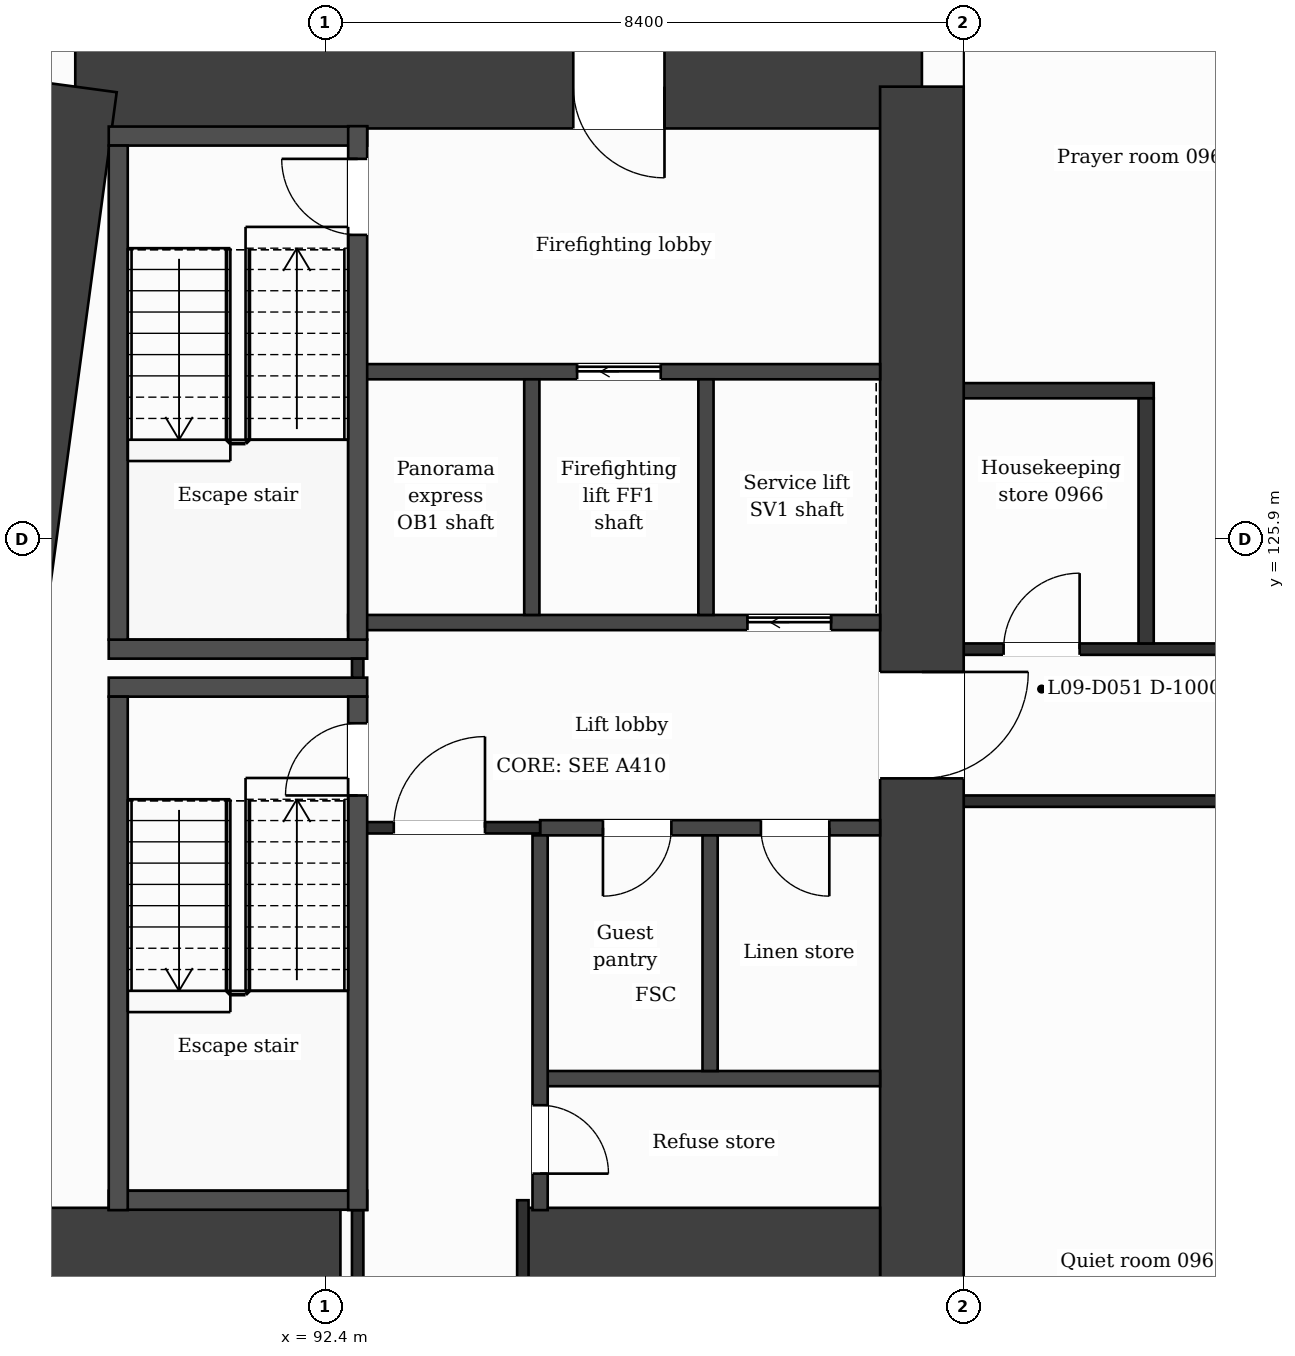
"""IFC4 building model, lengths in metres.
Left out: names, types, materials, properties, quantities, classifications, styles, units other than length and angle.
Written with IfcOpenShell. Run it as: python <this file> out.ifc"""

import sys

from ifc_helpers import new_model, si_unit, direction, frame, frame_2d, origin, place, context, subcontext, project, spatial, rectangle, extrude, element, fill, save


model = new_model("IFC4")
c1 = context("Model", 3, precision=1e-05, world=origin(), true_north=direction((0.0, 1.0)))
c2 = subcontext(c1, "Body", "Model", "MODEL_VIEW")
j1 = project(units=[si_unit("LENGTHUNIT", "METRE"), si_unit("PLANEANGLEUNIT", "RADIAN")], contexts=[c1])
p1 = place(None, origin())
s1 = spatial("IfcSite", under=j1, at=p1, CompositionType="ELEMENT")
p2 = place(p1, origin())
s2 = spatial("IfcBuilding", under=s1, at=p2, CompositionType="ELEMENT")
p3 = place(p2, frame((0.0, 0.0, 49.5)))
s3 = spatial("IfcBuildingStorey", under=s2, at=p3, CompositionType="ELEMENT", Elevation=49.5)
p4 = place(p3, frame((89.112, 131.85, 0.0), z_axis=(0.0, 0.0, 1.0), x_axis=(1.0, 0.0, 0.0)))
e1 = element("IfcWall", 1, at=p4, inside=s3, PredefinedType="SHEAR", context=c2, shape_type="SweptSolid", body=[
    extrude(rectangle(XDim=11.138, YDim=1.1, at=frame_2d((5.569, 0.0))), origin(), (0.0, 0.0, 1.0), 3.5),
])
p5 = place(p4, frame((6.552, 0.0, 0.0)))
e2 = element("IfcOpeningElement", 2, at=p5, cuts=e1, PredefinedType="OPENING", context=c2, shape_type="SweptSolid", body=[
    extrude(rectangle(XDim=1.2, YDim=2.1, at=frame_2d((0.6, 1.05))), frame((0.0, 0.56, 0.0), z_axis=(0.0, -1.0, 0.0), x_axis=(1.0, 0.0, 0.0)), (0.0, 0.0, 1.0), 1.12),
])
p6 = place(p3, frame((100.25, 131.85, 0.0), z_axis=(0.0, 0.0, 1.0), x_axis=(0.0, -1.0, 0.0)))
e3 = element("IfcWall", 3, at=p6, inside=s3, PredefinedType="SHEAR", context=c2, shape_type="SweptSolid", body=[
    extrude(rectangle(XDim=20.9, YDim=1.1, at=frame_2d((10.45, 0.0))), origin(), (0.0, 0.0, 1.0), 3.5),
])
p7 = place(p6, frame((7.7, 0.0, 0.0)))
e4 = element("IfcOpeningElement", 4, at=p7, cuts=e3, PredefinedType="OPENING", context=c2, shape_type="SweptSolid", body=[
    extrude(rectangle(XDim=1.4, YDim=2.1, at=frame_2d((0.7, 1.05))), frame((0.0, 0.56, 0.0), z_axis=(0.0, -1.0, 0.0), x_axis=(1.0, 0.0, 0.0)), (0.0, 0.0, 1.0), 1.12),
])
p8 = place(p3, frame((86.298, 110.95, 0.0), z_axis=(0.0, 0.0, 1.0), x_axis=(0.133400422634, 0.99106222168, 0.0)))
e5 = element("IfcWall", 5, at=p8, inside=s3, PredefinedType="SHEAR", context=c2, shape_type="SweptSolid", body=[
    extrude(rectangle(XDim=21.089, YDim=1.1, at=frame_2d((10.544, 0.0))), origin(), (0.0, 0.0, 1.0), 3.5),
])
p9 = place(p3, frame((87.523, 116.55, 0.0), z_axis=(0.0, 0.0, 1.0), x_axis=(1.0, 0.0, 0.0)))
e6 = element("IfcWall", 6, at=p9, inside=s3, PredefinedType="SHEAR", context=c2, shape_type="SweptSolid", body=[
    extrude(rectangle(XDim=5.077, YDim=1.1, at=frame_2d((2.539, 0.0))), origin(), (0.0, 0.0, 1.0), 3.5),
])
p10 = place(p3, frame((95.0, 116.55, 0.0), z_axis=(0.0, 0.0, 1.0), x_axis=(1.0, 0.0, 0.0)))
e7 = element("IfcWall", 7, at=p10, inside=s3, PredefinedType="SHEAR", context=c2, shape_type="SweptSolid", body=[
    extrude(rectangle(XDim=4.7, YDim=1.1, at=frame_2d((2.35, 0.0))), origin(), (0.0, 0.0, 1.0), 3.5),
])
p11 = place(p3, frame((89.552, 117.2, 0.0), z_axis=(0.0, 0.0, 1.0), x_axis=(1.0, 0.0, 0.0)))
e8 = element("IfcWall", 8, at=p11, inside=s3, PredefinedType="PARTITIONING", context=c2, shape_type="SweptSolid", body=[
    extrude(rectangle(XDim=3.4, YDim=0.25, at=frame_2d((1.7, 0.0))), origin(), (0.0, 0.0, 1.0), 3.18),
])
p12 = place(p3, frame((95.227, 118.8, 0.0), z_axis=(0.0, 0.0, 1.0), x_axis=(1.0, 0.0, 0.0)))
e9 = element("IfcWall", 9, at=p12, inside=s3, PredefinedType="PARTITIONING", context=c2, shape_type="SweptSolid", body=[
    extrude(rectangle(XDim=4.473, YDim=0.2, at=frame_2d((2.236, 0.0))), origin(), (0.0, 0.0, 1.0), 3.18),
])
p13 = place(p3, frame((95.227, 122.1, 0.0), z_axis=(0.0, 0.0, 1.0), x_axis=(1.0, 0.0, 0.0)))
e10 = element("IfcWall", 10, at=p13, inside=s3, PredefinedType="PARTITIONING", context=c2, shape_type="SweptSolid", body=[
    extrude(rectangle(XDim=4.473, YDim=0.2, at=frame_2d((2.236, 0.0))), origin(), (0.0, 0.0, 1.0), 3.18),
])
p14 = place(p13, frame((0.827, 0.0, 0.0)))
e11 = element("IfcOpeningElement", 11, at=p14, cuts=e10, PredefinedType="OPENING", context=c2, shape_type="SweptSolid", body=[
    extrude(rectangle(XDim=0.9, YDim=2.1, at=frame_2d((0.45, 1.05))), frame((0.0, 0.11, 0.0), z_axis=(0.0, -1.0, 0.0), x_axis=(1.0, 0.0, 0.0)), (0.0, 0.0, 1.0), 0.22),
])
p15 = place(p13, frame((2.905, 0.0, 0.0)))
e12 = element("IfcOpeningElement", 12, at=p15, cuts=e10, PredefinedType="OPENING", context=c2, shape_type="SweptSolid", body=[
    extrude(rectangle(XDim=0.9, YDim=2.1, at=frame_2d((0.45, 1.05))), frame((0.0, 0.11, 0.0), z_axis=(0.0, -1.0, 0.0), x_axis=(1.0, 0.0, 0.0)), (0.0, 0.0, 1.0), 0.22),
])
p16 = place(p3, frame((92.827, 122.1, 0.0), z_axis=(0.0, 0.0, 1.0), x_axis=(1.0, 0.0, 0.0)))
e13 = element("IfcWall", 13, at=p16, inside=s3, PredefinedType="PARTITIONING", context=c2, shape_type="SweptSolid", body=[
    extrude(rectangle(XDim=2.4, YDim=0.15, at=frame_2d((1.2, 0.0))), origin(), (0.0, 0.0, 1.0), 3.18),
])
p17 = place(p16, frame((0.475, 0.0, 0.0)))
e14 = element("IfcOpeningElement", 14, at=p17, cuts=e13, PredefinedType="OPENING", context=c2, shape_type="SweptSolid", body=[
    extrude(rectangle(XDim=1.2, YDim=2.1, at=frame_2d((0.6, 1.05))), frame((0.0, 0.085, 0.0), z_axis=(0.0, -1.0, 0.0), x_axis=(1.0, 0.0, 0.0)), (0.0, 0.0, 1.0), 0.17),
])
p18 = place(p3, frame((100.8, 122.45, 0.0), z_axis=(0.0, 0.0, 1.0), x_axis=(1.0, 0.0, 0.0)))
e15 = element("IfcWall", 15, at=p18, inside=s3, PredefinedType="PARTITIONING", context=c2, shape_type="SweptSolid", body=[
    extrude(rectangle(XDim=4.875, YDim=0.15, at=frame_2d((2.438, 0.0))), origin(), (0.0, 0.0, 1.0), 3.18),
])
for number, where, z_axis, x_axis in (
    (16, (89.552, 123.95, 0.0), (0.0, 0.0, 1.0), (1.0, 0.0, 0.0)),
    (17, (89.552, 124.45, 0.0), (0.0, 0.0, 1.0), (1.0, 0.0, 0.0)),
):
    element("IfcWall", number, at=place(p3, frame(where, z_axis=z_axis, x_axis=x_axis)), inside=s3, PredefinedType="PARTITIONING", context=c2, shape_type="SweptSolid", body=[
        extrude(rectangle(XDim=3.4, YDim=0.25, at=frame_2d((1.7, 0.0))), origin(), (0.0, 0.0, 1.0), 3.18),
    ])
p19 = place(p3, frame((100.8, 124.45, 0.0), z_axis=(0.0, 0.0, 1.0), x_axis=(1.0, 0.0, 0.0)))
e18 = element("IfcWall", 18, at=p19, inside=s3, PredefinedType="PARTITIONING", context=c2, shape_type="SweptSolid", body=[
    extrude(rectangle(XDim=4.875, YDim=0.15, at=frame_2d((2.438, 0.0))), origin(), (0.0, 0.0, 1.0), 3.18),
])
p20 = place(p19, frame((0.525, 0.0, 0.0)))
e19 = element("IfcOpeningElement", 19, at=p20, cuts=e18, PredefinedType="OPENING", context=c2, shape_type="SweptSolid", body=[
    extrude(rectangle(XDim=1.0, YDim=2.1, at=frame_2d((0.5, 1.05))), frame((0.0, 0.085, 0.0), z_axis=(0.0, -1.0, 0.0), x_axis=(1.0, 0.0, 0.0)), (0.0, 0.0, 1.0), 0.17),
])
p21 = place(p3, frame((92.702, 124.8, 0.0), z_axis=(0.0, 0.0, 1.0), x_axis=(1.0, 0.0, 0.0)))
e20 = element("IfcWall", 20, at=p21, inside=s3, PredefinedType="PARTITIONING", context=c2, shape_type="SweptSolid", body=[
    extrude(rectangle(XDim=6.998, YDim=0.2, at=frame_2d((3.499, 0.0))), origin(), (0.0, 0.0, 1.0), 3.18),
])
p22 = place(p21, frame((5.253, 0.0, 0.0)))
e21 = element("IfcOpeningElement", 21, at=p22, cuts=e20, PredefinedType="OPENING", context=c2, shape_type="SweptSolid", body=[
    extrude(rectangle(XDim=1.1, YDim=2.1, at=frame_2d((0.55, 1.05))), frame((0.0, 0.11, 0.0), z_axis=(0.0, -1.0, 0.0), x_axis=(1.0, 0.0, 0.0)), (0.0, 0.0, 1.0), 0.22),
])
p23 = place(p3, frame((100.8, 127.85, 0.0), z_axis=(0.0, 0.0, 1.0), x_axis=(1.0, 0.0, 0.0)))
e22 = element("IfcWall", 22, at=p23, inside=s3, PredefinedType="PARTITIONING", context=c2, shape_type="SweptSolid", body=[
    extrude(rectangle(XDim=2.5, YDim=0.2, at=frame_2d((1.25, 0.0))), origin(), (0.0, 0.0, 1.0), 3.18),
])
p24 = place(p3, frame((92.827, 128.1, 0.0), z_axis=(0.0, 0.0, 1.0), x_axis=(1.0, 0.0, 0.0)))
e23 = element("IfcWall", 23, at=p24, inside=s3, PredefinedType="PARTITIONING", context=c2, shape_type="SweptSolid", body=[
    extrude(rectangle(XDim=6.873, YDim=0.2, at=frame_2d((3.437, 0.0))), origin(), (0.0, 0.0, 1.0), 3.18),
])
p25 = place(p24, frame((2.887, 0.0, 0.0)))
e24 = element("IfcOpeningElement", 24, at=p25, cuts=e23, PredefinedType="OPENING", context=c2, shape_type="SweptSolid", body=[
    extrude(rectangle(XDim=1.1, YDim=2.1, at=frame_2d((0.55, 1.05))), frame((0.0, 0.11, 0.0), z_axis=(0.0, -1.0, 0.0), x_axis=(1.0, 0.0, 0.0)), (0.0, 0.0, 1.0), 0.22),
])
p26 = place(p3, frame((89.552, 131.2, 0.0), z_axis=(0.0, 0.0, 1.0), x_axis=(1.0, 0.0, 0.0)))
e25 = element("IfcWall", 25, at=p26, inside=s3, PredefinedType="PARTITIONING", context=c2, shape_type="SweptSolid", body=[
    extrude(rectangle(XDim=3.4, YDim=0.25, at=frame_2d((1.7, 0.0))), origin(), (0.0, 0.0, 1.0), 3.18),
])
p27 = place(p3, frame((89.677, 117.07, 0.0), z_axis=(0.0, 0.0, 1.0), x_axis=(0.0, 1.0, 0.0)))
e26 = element("IfcWall", 26, at=p27, inside=s3, PredefinedType="PARTITIONING", context=c2, shape_type="SweptSolid", body=[
    extrude(rectangle(XDim=6.755, YDim=0.25, at=frame_2d((3.377, 0.0))), origin(), (0.0, 0.0, 1.0), 3.18),
])
p28 = place(p3, frame((89.677, 124.575, 0.0), z_axis=(0.0, 0.0, 1.0), x_axis=(0.0, 1.0, 0.0)))
e27 = element("IfcWall", 27, at=p28, inside=s3, PredefinedType="PARTITIONING", context=c2, shape_type="SweptSolid", body=[
    extrude(rectangle(XDim=6.5, YDim=0.25, at=frame_2d((3.25, 0.0))), origin(), (0.0, 0.0, 1.0), 3.18),
])
p29 = place(p3, frame((92.827, 116.0, 0.0), z_axis=(0.0, 0.0, 1.0), x_axis=(0.0, 1.0, 0.0)))
e28 = element("IfcWall", 28, at=p29, inside=s3, PredefinedType="PARTITIONING", context=c2, shape_type="SweptSolid", body=[
    extrude(rectangle(XDim=1.07, YDim=0.15, at=frame_2d((0.535, 0.0))), origin(), (0.0, 0.0, 1.0), 3.18),
])
p30 = place(p3, frame((92.827, 124.075, 0.0), z_axis=(0.0, 0.0, 1.0), x_axis=(0.0, 1.0, 0.0)))
e29 = element("IfcWall", 29, at=p30, inside=s3, PredefinedType="PARTITIONING", context=c2, shape_type="SweptSolid", body=[
    extrude(rectangle(XDim=0.25, YDim=0.15, at=frame_2d((0.125, 0.0))), origin(), (0.0, 0.0, 1.0), 3.18),
])
p31 = place(p3, frame((92.827, 117.07, 0.0), z_axis=(0.0, 0.0, 1.0), x_axis=(0.0, 1.0, 0.0)))
e30 = element("IfcWall", 30, at=p31, inside=s3, PredefinedType="PARTITIONING", context=c2, shape_type="SweptSolid", body=[
    extrude(rectangle(XDim=6.755, YDim=0.25, at=frame_2d((3.377, 0.0))), origin(), (0.0, 0.0, 1.0), 3.18),
])
p32 = place(p31, frame((5.455, 0.0, 0.0)))
e31 = element("IfcOpeningElement", 31, at=p32, cuts=e30, PredefinedType="OPENING", context=c2, shape_type="SweptSolid", body=[
    extrude(rectangle(XDim=0.95, YDim=2.1, at=frame_2d((0.475, 1.05))), frame((0.0, 0.135, 0.0), z_axis=(0.0, -1.0, 0.0), x_axis=(1.0, 0.0, 0.0)), (0.0, 0.0, 1.0), 0.27),
])
p33 = place(p3, frame((92.827, 124.575, 0.0), z_axis=(0.0, 0.0, 1.0), x_axis=(0.0, 1.0, 0.0)))
e32 = element("IfcWall", 32, at=p33, inside=s3, PredefinedType="PARTITIONING", context=c2, shape_type="SweptSolid", body=[
    extrude(rectangle(XDim=6.755, YDim=0.25, at=frame_2d((3.377, 0.0))), origin(), (0.0, 0.0, 1.0), 3.18),
])
p34 = place(p33, frame((5.325, 0.0, 0.0)))
e33 = element("IfcOpeningElement", 33, at=p34, cuts=e32, PredefinedType="OPENING", context=c2, shape_type="SweptSolid", body=[
    extrude(rectangle(XDim=1.0, YDim=2.1, at=frame_2d((0.5, 1.05))), frame((0.0, 0.135, 0.0), z_axis=(0.0, -1.0, 0.0), x_axis=(1.0, 0.0, 0.0)), (0.0, 0.0, 1.0), 0.27),
])
p35 = place(p3, frame((95.0, 116.0, 0.0), z_axis=(0.0, 0.0, 1.0), x_axis=(0.0, 1.0, 0.0)))
e34 = element("IfcWall", 34, at=p35, inside=s3, PredefinedType="PARTITIONING", context=c2, shape_type="SweptSolid", body=[
    extrude(rectangle(XDim=1.2, YDim=0.15, at=frame_2d((0.6, 0.0))), origin(), (0.0, 0.0, 1.0), 3.18),
])
p36 = place(p3, frame((95.118, 124.9, 0.0), z_axis=(0.0, 0.0, 1.0), x_axis=(0.0, 1.0, 0.0)))
e35 = element("IfcWall", 35, at=p36, inside=s3, PredefinedType="PARTITIONING", context=c2, shape_type="SweptSolid", body=[
    extrude(rectangle(XDim=3.1, YDim=0.2, at=frame_2d((1.55, 0.0))), origin(), (0.0, 0.0, 1.0), 3.18),
])
p37 = place(p3, frame((95.227, 117.07, 0.0), z_axis=(0.0, 0.0, 1.0), x_axis=(0.0, 1.0, 0.0)))
e36 = element("IfcWall", 36, at=p37, inside=s3, PredefinedType="PARTITIONING", context=c2, shape_type="SweptSolid", body=[
    extrude(rectangle(XDim=4.93, YDim=0.2, at=frame_2d((2.465, 0.0))), origin(), (0.0, 0.0, 1.0), 3.18),
])
p38 = place(p37, frame((0.48, 0.0, 0.0)))
e37 = element("IfcOpeningElement", 37, at=p38, cuts=e36, PredefinedType="OPENING", context=c2, shape_type="SweptSolid", body=[
    extrude(rectangle(XDim=0.9, YDim=2.1, at=frame_2d((0.45, 1.05))), frame((0.0, 0.11, 0.0), z_axis=(0.0, -1.0, 0.0), x_axis=(1.0, 0.0, 0.0)), (0.0, 0.0, 1.0), 0.22),
])
for number, where, z_axis, x_axis in (
    (38, (97.409, 124.9, 0.0), (0.0, 0.0, 1.0), (0.0, 1.0, 0.0)),
    (39, (97.463, 118.9, 0.0), (0.0, 0.0, 1.0), (0.0, 1.0, 0.0)),
):
    element("IfcWall", number, at=place(p3, frame(where, z_axis=z_axis, x_axis=x_axis)), inside=s3, PredefinedType="PARTITIONING", context=c2, shape_type="SweptSolid", body=[
        extrude(rectangle(XDim=3.1, YDim=0.2, at=frame_2d((1.55, 0.0))), origin(), (0.0, 0.0, 1.0), 3.18),
    ])
p39 = place(p3, frame((103.2, 124.525, 0.0), z_axis=(0.0, 0.0, 1.0), x_axis=(0.0, 1.0, 0.0)))
e40 = element("IfcWall", 40, at=p39, inside=s3, PredefinedType="PARTITIONING", context=c2, shape_type="SweptSolid", body=[
    extrude(rectangle(XDim=3.225, YDim=0.2, at=frame_2d((1.613, 0.0))), origin(), (0.0, 0.0, 1.0), 3.18),
])
p40 = place(p17, origin())
e41 = element("IfcDoor", 41, at=p40, inside=s3, OperationType="SINGLE_SWING_RIGHT", PredefinedType="DOOR", context=c2, shape_type="SweptSolid", body=[
    extrude(rectangle(XDim=1.2, YDim=2.1, at=frame_2d((0.6, 1.05))), frame((0.0, 0.025, 0.0), z_axis=(0.0, -1.0, 0.0), x_axis=(1.0, 0.0, 0.0)), (0.0, 0.0, 1.0), 0.05),
])
fill(e14, e41)
p41 = place(p25, origin())
e42 = element("IfcDoor", 42, at=p41, inside=s3, OperationType="SLIDING_TO_LEFT", PredefinedType="DOOR", context=c2, shape_type="SweptSolid", body=[
    extrude(rectangle(XDim=1.1, YDim=2.1, at=frame_2d((0.55, 1.05))), frame((0.0, 0.025, 0.0), z_axis=(0.0, -1.0, 0.0), x_axis=(1.0, 0.0, 0.0)), (0.0, 0.0, 1.0), 0.05),
])
fill(e24, e42)
p42 = place(p22, origin())
e43 = element("IfcDoor", 43, at=p42, inside=s3, OperationType="SLIDING_TO_LEFT", PredefinedType="DOOR", context=c2, shape_type="SweptSolid", body=[
    extrude(rectangle(XDim=1.1, YDim=2.1, at=frame_2d((0.55, 1.05))), frame((0.0, 0.025, 0.0), z_axis=(0.0, -1.0, 0.0), x_axis=(1.0, 0.0, 0.0)), (0.0, 0.0, 1.0), 0.05),
])
fill(e21, e43)
p43 = place(p14, origin())
e44 = element("IfcDoor", 44, at=p43, inside=s3, OperationType="SINGLE_SWING_LEFT", PredefinedType="DOOR", context=c2, shape_type="SweptSolid", body=[
    extrude(rectangle(XDim=0.9, YDim=2.1, at=frame_2d((0.45, 1.05))), frame((0.0, 0.025, 0.0), z_axis=(0.0, -1.0, 0.0), x_axis=(1.0, 0.0, 0.0)), (0.0, 0.0, 1.0), 0.05),
])
fill(e11, e44)
p44 = place(p15, origin())
e45 = element("IfcDoor", 45, at=p44, inside=s3, OperationType="SINGLE_SWING_RIGHT", PredefinedType="DOOR", context=c2, shape_type="SweptSolid", body=[
    extrude(rectangle(XDim=0.9, YDim=2.1, at=frame_2d((0.45, 1.05))), frame((0.0, 0.025, 0.0), z_axis=(0.0, -1.0, 0.0), x_axis=(1.0, 0.0, 0.0)), (0.0, 0.0, 1.0), 0.05),
])
fill(e12, e45)
p45 = place(p32, origin())
e46 = element("IfcDoor", 46, at=p45, inside=s3, OperationType="SINGLE_SWING_LEFT", PredefinedType="DOOR", context=c2, shape_type="SweptSolid", body=[
    extrude(rectangle(XDim=0.95, YDim=2.1, at=frame_2d((0.475, 1.05))), frame((0.0, 0.025, 0.0), z_axis=(0.0, -1.0, 0.0), x_axis=(1.0, 0.0, 0.0)), (0.0, 0.0, 1.0), 0.05),
])
fill(e31, e46)
p46 = place(p34, origin())
e47 = element("IfcDoor", 47, at=p46, inside=s3, OperationType="SINGLE_SWING_RIGHT", PredefinedType="DOOR", context=c2, shape_type="SweptSolid", body=[
    extrude(rectangle(XDim=1.0, YDim=2.1, at=frame_2d((0.5, 1.05))), frame((0.0, 0.025, 0.0), z_axis=(0.0, -1.0, 0.0), x_axis=(1.0, 0.0, 0.0)), (0.0, 0.0, 1.0), 0.05),
])
fill(e33, e47)
p47 = place(p38, origin())
e48 = element("IfcDoor", 48, at=p47, inside=s3, OperationType="SINGLE_SWING_LEFT", PredefinedType="DOOR", context=c2, shape_type="SweptSolid", body=[
    extrude(rectangle(XDim=0.9, YDim=2.1, at=frame_2d((0.45, 1.05))), frame((0.0, 0.025, 0.0), z_axis=(0.0, -1.0, 0.0), x_axis=(1.0, 0.0, 0.0)), (0.0, 0.0, 1.0), 0.05),
])
fill(e37, e48)
p48 = place(p20, origin())
e49 = element("IfcDoor", 49, at=p48, inside=s3, OperationType="SINGLE_SWING_RIGHT", PredefinedType="DOOR", context=c2, shape_type="SweptSolid", body=[
    extrude(rectangle(XDim=1.0, YDim=2.1, at=frame_2d((0.5, 1.05))), frame((0.0, 0.025, 0.0), z_axis=(0.0, -1.0, 0.0), x_axis=(1.0, 0.0, 0.0)), (0.0, 0.0, 1.0), 0.05),
])
fill(e19, e49)
p49 = place(p5, origin())
e50 = element("IfcDoor", 50, at=p49, inside=s3, OperationType="SINGLE_SWING_RIGHT", PredefinedType="DOOR", context=c2, shape_type="SweptSolid", body=[
    extrude(rectangle(XDim=1.2, YDim=2.1, at=frame_2d((0.6, 1.05))), frame((0.0, 0.025, 0.0), z_axis=(0.0, -1.0, 0.0), x_axis=(1.0, 0.0, 0.0)), (0.0, 0.0, 1.0), 0.05),
])
fill(e2, e50)
p50 = place(p7, origin())
e51 = element("IfcDoor", 51, at=p50, inside=s3, OperationType="SINGLE_SWING_LEFT", PredefinedType="DOOR", context=c2, shape_type="SweptSolid", body=[
    extrude(rectangle(XDim=1.4, YDim=2.1, at=frame_2d((0.7, 1.05))), frame((0.0, 0.025, 0.0), z_axis=(0.0, -1.0, 0.0), x_axis=(1.0, 0.0, 0.0)), (0.0, 0.0, 1.0), 0.05),
])
fill(e4, e51)
save(model, sys.argv[1])
